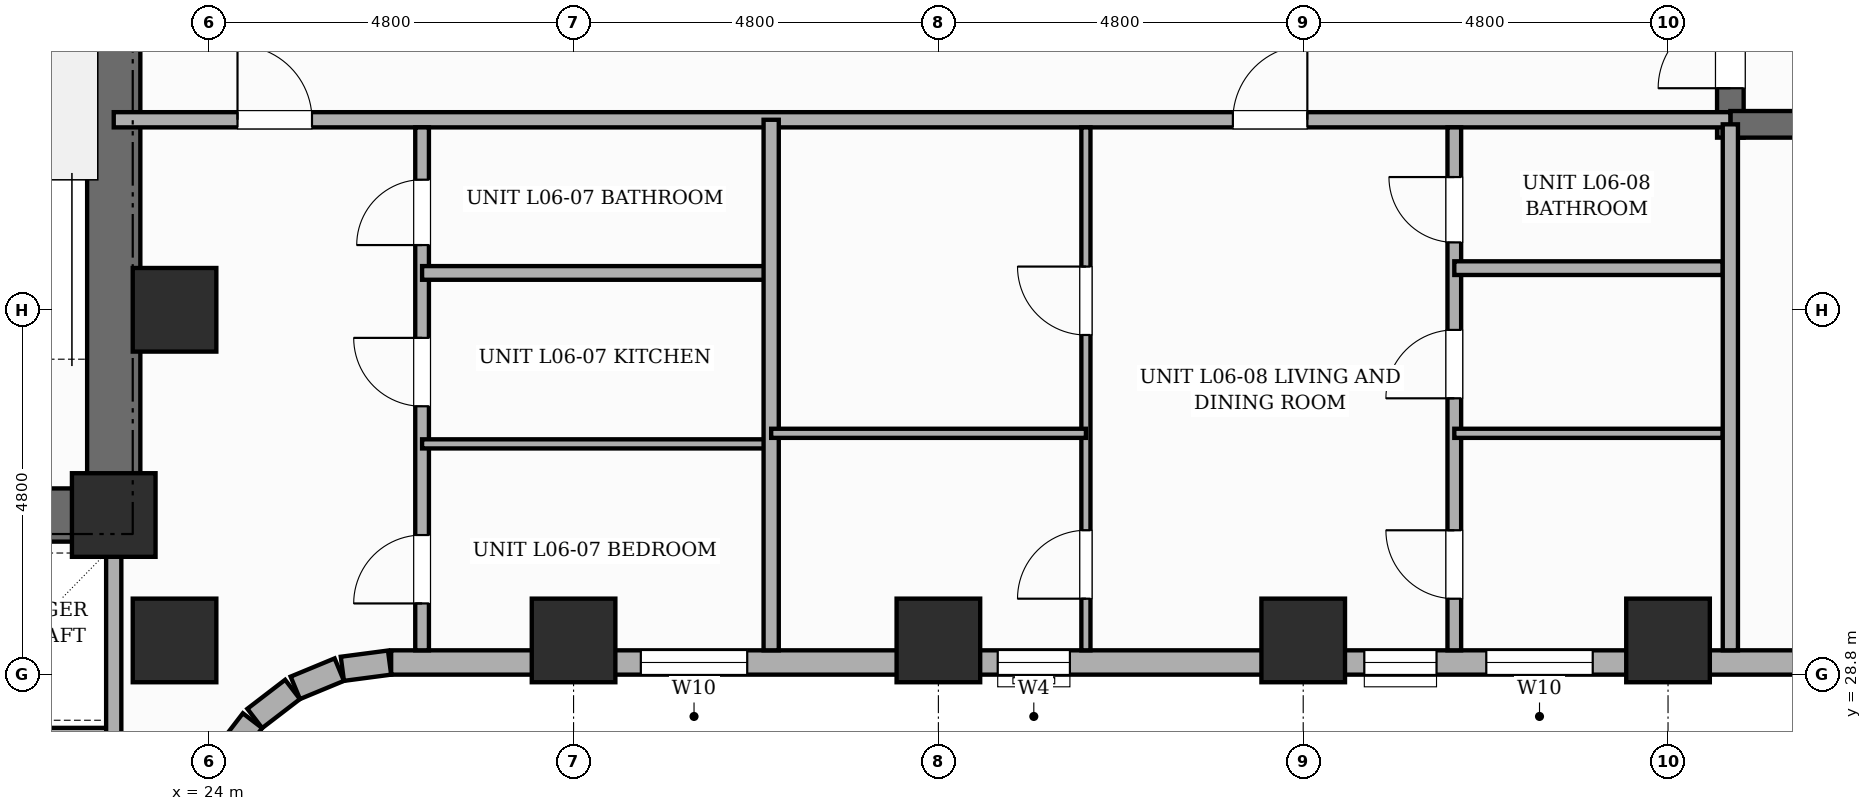
"""IFC4 building model, lengths in metres.
Left out: names, types, materials, properties, quantities, classifications, styles, units other than length and angle.
Written with IfcOpenShell. Run it as: python <this file> out.ifc"""

import sys

from ifc_helpers import new_model, si_unit, direction, frame, frame_2d, origin, origin_2d, place, context, subcontext, project, spatial, rectangle, extrude, element, fill, save


model = new_model("IFC4")
c1 = context("Model", 3, precision=1e-05, world=origin(), true_north=direction((0.0, 1.0)))
c2 = subcontext(c1, "Body", "Model", "MODEL_VIEW")
j1 = project(units=[si_unit("LENGTHUNIT", "METRE"), si_unit("PLANEANGLEUNIT", "RADIAN")], contexts=[c1])
p1 = place(None, origin())
s1 = spatial("IfcSite", under=j1, at=p1, CompositionType="ELEMENT")
p2 = place(p1, origin())
s2 = spatial("IfcBuilding", under=s1, at=p2, CompositionType="ELEMENT")
p3 = place(p2, frame((0.0, 0.0, 28.6)))
s3 = spatial("IfcBuildingStorey", under=s2, at=p3, CompositionType="ELEMENT", Elevation=28.6)
p4 = place(p3, frame((22.75, 30.55, 0.0), z_axis=(0.0, 0.0, 1.0), x_axis=(0.0, 1.0, 0.0)))
e1 = element("IfcWall", 1, at=p4, inside=s3, PredefinedType="SHEAR", context=c2, shape_type="SweptSolid", body=[
    extrude(rectangle(XDim=15.6, YDim=0.7, at=frame_2d((7.8, 0.0))), origin(), (0.0, 0.0, 1.0), 3.6),
])
p5 = place(p4, frame((10.8, 0.0, 0.0)))
e2 = element("IfcOpeningElement", 2, at=p5, cuts=e1, PredefinedType="OPENING", context=c2, shape_type="SweptSolid", body=[
    extrude(rectangle(XDim=1.0, YDim=2.15, at=frame_2d((0.5, 1.075))), frame((0.0, 0.36, 0.0), z_axis=(0.0, -1.0, 0.0), x_axis=(1.0, 0.0, 0.0)), (0.0, 0.0, 1.0), 0.72),
])
p6 = place(p3, frame((18.84, 30.9, 0.0), z_axis=(0.0, 0.0, 1.0), x_axis=(1.0, 0.0, 0.0)))
e3 = element("IfcWall", 3, at=p6, inside=s3, PredefinedType="SHEAR", context=c2, shape_type="SweptSolid", body=[
    extrude(rectangle(XDim=3.91, YDim=0.7, at=frame_2d((1.955, 0.0))), origin(), (0.0, 0.0, 1.0), 3.6),
])
p7 = place(p3, frame((44.02, 35.865, 0.0), z_axis=(0.0, 0.0, 1.0), x_axis=(0.0, 1.0, 0.0)))
e4 = element("IfcWall", 4, at=p7, inside=s3, PredefinedType="SHEAR", context=c2, shape_type="SweptSolid", body=[
    extrude(rectangle(XDim=8.97, YDim=0.35, at=frame_2d((4.485, 0.0))), origin(), (0.0, 0.0, 1.0), 3.6),
])
p8 = place(p7, frame((0.65, 0.0, 0.0)))
e5 = element("IfcOpeningElement", 5, at=p8, cuts=e4, PredefinedType="OPENING", context=c2, shape_type="SweptSolid", body=[
    extrude(rectangle(XDim=0.95, YDim=2.1, at=frame_2d((0.475, 1.05))), frame((0.0, 0.185, 0.0), z_axis=(0.0, -1.0, 0.0), x_axis=(1.0, 0.0, 0.0)), (0.0, 0.0, 1.0), 0.37),
])
p9 = place(p3, frame((44.02, 36.04, 0.0), z_axis=(0.0, 0.0, 1.0), x_axis=(1.0, 0.0, 0.0)))
e6 = element("IfcWall", 6, at=p9, inside=s3, PredefinedType="SHEAR", context=c2, shape_type="SweptSolid", body=[
    extrude(rectangle(XDim=3.58, YDim=0.35, at=frame_2d((1.79, 0.0))), origin(), (0.0, 0.0, 1.0), 3.6),
])
for number, where, z_axis, x_axis in (
    (7, (22.75, 30.9, 0.0), (0.0, 0.0, 1.0), (1.0, 0.0, 0.0)),
    (8, (23.55, 29.25, 0.0), (0.0, 0.0, 1.0), (1.0, 0.0, 0.0)),
    (9, (23.55, 33.6, 0.0), (0.0, 0.0, 1.0), (1.0, 0.0, 0.0)),
    (10, (28.8, 29.25, 0.0), (0.0, 0.0, 1.0), (1.0, 0.0, 0.0)),
    (11, (33.6, 29.25, 0.0), (0.0, 0.0, 1.0), (1.0, 0.0, 0.0)),
    (12, (38.4, 29.25, 0.0), (0.0, 0.0, 1.0), (1.0, 0.0, 0.0)),
    (13, (43.2, 29.25, 0.0), (0.0, 0.0, 1.0), (1.0, 0.0, 0.0)),
):
    element("IfcColumn", number, at=place(p3, frame(where, z_axis=z_axis, x_axis=x_axis)), inside=s3, PredefinedType="COLUMN", context=c2, shape_type="SweptSolid", body=[
        extrude(rectangle(XDim=1.1, YDim=1.1, at=origin_2d()), origin(), (0.0, 0.0, 1.0), 3.6),
    ])
p10 = place(p3, frame((55.2, 28.96, 0.0), z_axis=(0.0, 0.0, 1.0), x_axis=(-1.0, 0.0, 0.0)))
e14 = element("IfcWall", 14, at=p10, inside=s3, PredefinedType="STANDARD", context=c2, shape_type="SweptSolid", body=[
    extrude(rectangle(XDim=28.8, YDim=0.32, at=frame_2d((14.4, 0.0))), origin(), (0.0, 0.0, 1.0), 2.53),
])
p11 = place(p10, frame((24.115, 0.0, 0.65)))
e15 = element("IfcOpeningElement", 15, at=p11, cuts=e14, PredefinedType="OPENING", context=c2, shape_type="SweptSolid", body=[
    extrude(rectangle(XDim=1.4, YDim=1.1, at=frame_2d((0.7, 0.55))), frame((0.0, 0.17, 0.0), z_axis=(0.0, -1.0, 0.0), x_axis=(1.0, 0.0, 0.0)), (0.0, 0.0, 1.0), 0.34),
])
p12 = place(p10, frame((12.991, 0.0, 0.65)))
e16 = element("IfcOpeningElement", 16, at=p12, cuts=e14, PredefinedType="OPENING", context=c2, shape_type="SweptSolid", body=[
    extrude(rectangle(XDim=1.4, YDim=1.1, at=frame_2d((0.7, 0.55))), frame((0.0, 0.17, 0.0), z_axis=(0.0, -1.0, 0.0), x_axis=(1.0, 0.0, 0.0)), (0.0, 0.0, 1.0), 0.34),
])
p13 = place(p10, frame((19.869, 0.0, 0.45)))
e17 = element("IfcOpeningElement", 17, at=p13, cuts=e14, PredefinedType="OPENING", context=c2, shape_type="SweptSolid", body=[
    extrude(rectangle(XDim=0.95, YDim=1.8, at=frame_2d((0.475, 0.9))), frame((0.0, 0.17, 0.0), z_axis=(0.0, -1.0, 0.0), x_axis=(1.0, 0.0, 0.0)), (0.0, 0.0, 1.0), 0.34),
])
p14 = place(p10, frame((4.79, 0.0, 0.65)))
e18 = element("IfcOpeningElement", 18, at=p14, cuts=e14, PredefinedType="OPENING", context=c2, shape_type="SweptSolid", body=[
    extrude(rectangle(XDim=1.4, YDim=1.1, at=frame_2d((0.7, 0.55))), frame((0.0, 0.17, 0.0), z_axis=(0.0, -1.0, 0.0), x_axis=(1.0, 0.0, 0.0)), (0.0, 0.0, 1.0), 0.34),
])
p15 = place(p10, frame((0.47, 0.0, 0.65)))
e19 = element("IfcOpeningElement", 19, at=p15, cuts=e14, PredefinedType="OPENING", context=c2, shape_type="SweptSolid", body=[
    extrude(rectangle(XDim=1.4, YDim=1.1, at=frame_2d((0.7, 0.55))), frame((0.0, 0.17, 0.0), z_axis=(0.0, -1.0, 0.0), x_axis=(1.0, 0.0, 0.0)), (0.0, 0.0, 1.0), 0.34),
])
p16 = place(p10, frame((15.046, 0.0, 0.45)))
e20 = element("IfcOpeningElement", 20, at=p16, cuts=e14, PredefinedType="OPENING", context=c2, shape_type="SweptSolid", body=[
    extrude(rectangle(XDim=0.95, YDim=1.8, at=frame_2d((0.475, 0.9))), frame((0.0, 0.17, 0.0), z_axis=(0.0, -1.0, 0.0), x_axis=(1.0, 0.0, 0.0)), (0.0, 0.0, 1.0), 0.34),
])
p17 = place(p3, frame((26.379, 28.958, 0.0), z_axis=(0.0, 0.0, 1.0), x_axis=(-0.991447664465, -0.130504898859, 0.0)))
e21 = element("IfcWall", 21, at=p17, inside=s3, PredefinedType="STANDARD", context=c2, shape_type="SweptSolid", body=[
    extrude(rectangle(XDim=0.627, YDim=0.32, at=frame_2d((0.313, 0.0))), origin(), (0.0, 0.0, 1.0), 2.53),
])
p18 = place(p3, frame((25.718, 28.866, 0.0), z_axis=(0.0, 0.0, 1.0), x_axis=(-0.923836271867, -0.382787856107, 0.0)))
e22 = element("IfcWall", 22, at=p18, inside=s3, PredefinedType="STANDARD", context=c2, shape_type="SweptSolid", body=[
    extrude(rectangle(XDim=0.626, YDim=0.32, at=frame_2d((0.313, 0.0))), origin(), (0.0, 0.0, 1.0), 3.35),
])
for number, where, z_axis, x_axis in (
    (23, (25.103, 28.605, 0.0), (0.0, 0.0, 1.0), (-0.793, -0.609, 0.0)),
    (24, (24.576, 28.195, 0.0), (0.0, 0.0, 1.0), (-0.609, -0.793, 0.0)),
):
    element("IfcWall", number, at=place(p3, frame(where, z_axis=z_axis, x_axis=x_axis)), inside=s3, PredefinedType="STANDARD", context=c2, shape_type="SweptSolid", body=[
        extrude(rectangle(XDim=0.626, YDim=0.32, at=frame_2d((0.313, 0.0))), origin(), (0.0, 0.0, 1.0), 3.35),
    ])
p19 = place(p3, frame((15.5, 28.0, 0.0), z_axis=(0.0, 0.0, 1.0), x_axis=(1.0, 0.0, 0.0)))
e25 = element("IfcWall", 25, at=p19, inside=s3, PredefinedType="POLYGONAL", context=c2, shape_type="SweptSolid", body=[
    extrude(rectangle(XDim=7.25, YDim=0.2, at=frame_2d((3.625, 0.0))), origin(), (0.0, 0.0, 1.0), 3.35),
])
p20 = place(p3, frame((22.75, 27.9, 0.0), z_axis=(0.0, 0.0, 1.0), x_axis=(0.0, 1.0, 0.0)))
e26 = element("IfcWall", 26, at=p20, inside=s3, PredefinedType="POLYGONAL", context=c2, shape_type="SweptSolid", body=[
    extrude(rectangle(XDim=3.0, YDim=0.2, at=frame_2d((1.5, 0.0))), origin(), (0.0, 0.0, 1.0), 3.35),
])
p21 = place(p3, frame((22.75, 36.1, 0.0), z_axis=(0.0, 0.0, 1.0), x_axis=(1.0, 0.0, 0.0)))
e27 = element("IfcWall", 27, at=p21, inside=s3, PredefinedType="PARTITIONING", context=c2, shape_type="SweptSolid", body=[
    extrude(rectangle(XDim=21.27, YDim=0.2, at=frame_2d((10.635, 0.0))), origin(), (0.0, 0.0, 1.0), 3.35),
])
p22 = place(p21, frame((1.628, 0.0, 0.0)))
e28 = element("IfcOpeningElement", 28, at=p22, cuts=e27, PredefinedType="OPENING", context=c2, shape_type="SweptSolid", body=[
    extrude(rectangle(XDim=0.98, YDim=2.18, at=frame_2d((0.49, 1.09))), frame((0.0, 0.11, 0.0), z_axis=(0.0, -1.0, 0.0), x_axis=(1.0, 0.0, 0.0)), (0.0, 0.0, 1.0), 0.22),
])
p23 = place(p21, frame((14.725, 0.0, 0.0)))
e29 = element("IfcOpeningElement", 29, at=p23, cuts=e27, PredefinedType="OPENING", context=c2, shape_type="SweptSolid", body=[
    extrude(rectangle(XDim=0.98, YDim=2.18, at=frame_2d((0.49, 1.09))), frame((0.0, 0.11, 0.0), z_axis=(0.0, -1.0, 0.0), x_axis=(1.0, 0.0, 0.0)), (0.0, 0.0, 1.0), 0.22),
])
p24 = place(p3, frame((26.807, 29.12, 0.0), z_axis=(0.0, 0.0, 1.0), x_axis=(0.0, 1.0, 0.0)))
e30 = element("IfcWall", 30, at=p24, inside=s3, PredefinedType="PLUMBINGWALL", context=c2, shape_type="SweptSolid", body=[
    extrude(rectangle(XDim=6.88, YDim=0.18, at=frame_2d((3.44, 0.0))), origin(), (0.0, 0.0, 1.0), 3.35),
])
p25 = place(p24, frame((0.617, 0.0, 0.0)))
e31 = element("IfcOpeningElement", 31, at=p25, cuts=e30, PredefinedType="OPENING", context=c2, shape_type="SweptSolid", body=[
    extrude(rectangle(XDim=0.9, YDim=2.15, at=frame_2d((0.45, 1.075))), frame((0.0, 0.1, 0.0), z_axis=(0.0, -1.0, 0.0), x_axis=(1.0, 0.0, 0.0)), (0.0, 0.0, 1.0), 0.2),
])
p26 = place(p24, frame((3.21, 0.0, 0.0)))
e32 = element("IfcOpeningElement", 32, at=p26, cuts=e30, PredefinedType="OPENING", context=c2, shape_type="SweptSolid", body=[
    extrude(rectangle(XDim=0.9, YDim=2.15, at=frame_2d((0.45, 1.075))), frame((0.0, 0.1, 0.0), z_axis=(0.0, -1.0, 0.0), x_axis=(1.0, 0.0, 0.0)), (0.0, 0.0, 1.0), 0.2),
])
p27 = place(p24, frame((5.332, 0.0, 0.0)))
e33 = element("IfcOpeningElement", 33, at=p27, cuts=e30, PredefinedType="OPENING", context=c2, shape_type="SweptSolid", body=[
    extrude(rectangle(XDim=0.86, YDim=2.1, at=frame_2d((0.43, 1.05))), frame((0.0, 0.1, 0.0), z_axis=(0.0, -1.0, 0.0), x_axis=(1.0, 0.0, 0.0)), (0.0, 0.0, 1.0), 0.2),
])
p28 = place(p3, frame((26.807, 31.836, 0.0), z_axis=(0.0, 0.0, 1.0), x_axis=(1.0, 0.0, 0.0)))
e34 = element("IfcWall", 34, at=p28, inside=s3, PredefinedType="PARTITIONING", context=c2, shape_type="SweptSolid", body=[
    extrude(rectangle(XDim=4.593, YDim=0.12, at=frame_2d((2.296, 0.0))), origin(), (0.0, 0.0, 1.0), 3.35),
])
p29 = place(p3, frame((26.807, 34.085, 0.0), z_axis=(0.0, 0.0, 1.0), x_axis=(1.0, 0.0, 0.0)))
e35 = element("IfcWall", 35, at=p29, inside=s3, PredefinedType="PLUMBINGWALL", context=c2, shape_type="SweptSolid", body=[
    extrude(rectangle(XDim=4.593, YDim=0.18, at=frame_2d((2.296, 0.0))), origin(), (0.0, 0.0, 1.0), 3.35),
])
p30 = place(p3, frame((31.4, 29.12, 0.0), z_axis=(0.0, 0.0, 1.0), x_axis=(0.0, 1.0, 0.0)))
e36 = element("IfcWall", 36, at=p30, inside=s3, PredefinedType="SOLIDWALL", context=c2, shape_type="SweptSolid", body=[
    extrude(rectangle(XDim=6.98, YDim=0.2, at=frame_2d((3.49, 0.0))), origin(), (0.0, 0.0, 1.0), 3.35),
])
p31 = place(p3, frame((40.388, 29.12, 0.0), z_axis=(0.0, 0.0, 1.0), x_axis=(0.0, 1.0, 0.0)))
e37 = element("IfcWall", 37, at=p31, inside=s3, PredefinedType="PLUMBINGWALL", context=c2, shape_type="SweptSolid", body=[
    extrude(rectangle(XDim=6.88, YDim=0.18, at=frame_2d((3.44, 0.0))), origin(), (0.0, 0.0, 1.0), 3.35),
])
p32 = place(p31, frame((0.679, 0.0, 0.0)))
e38 = element("IfcOpeningElement", 38, at=p32, cuts=e37, PredefinedType="OPENING", context=c2, shape_type="SweptSolid", body=[
    extrude(rectangle(XDim=0.9, YDim=2.15, at=frame_2d((0.45, 1.075))), frame((0.0, 0.1, 0.0), z_axis=(0.0, -1.0, 0.0), x_axis=(1.0, 0.0, 0.0)), (0.0, 0.0, 1.0), 0.2),
])
p33 = place(p31, frame((3.315, 0.0, 0.0)))
e39 = element("IfcOpeningElement", 39, at=p33, cuts=e37, PredefinedType="OPENING", context=c2, shape_type="SweptSolid", body=[
    extrude(rectangle(XDim=0.9, YDim=2.15, at=frame_2d((0.45, 1.075))), frame((0.0, 0.1, 0.0), z_axis=(0.0, -1.0, 0.0), x_axis=(1.0, 0.0, 0.0)), (0.0, 0.0, 1.0), 0.2),
])
p34 = place(p31, frame((5.366, 0.0, 0.0)))
e40 = element("IfcOpeningElement", 40, at=p34, cuts=e37, PredefinedType="OPENING", context=c2, shape_type="SweptSolid", body=[
    extrude(rectangle(XDim=0.86, YDim=2.1, at=frame_2d((0.43, 1.05))), frame((0.0, 0.1, 0.0), z_axis=(0.0, -1.0, 0.0), x_axis=(1.0, 0.0, 0.0)), (0.0, 0.0, 1.0), 0.2),
])
p35 = place(p3, frame((35.541, 29.12, 0.0), z_axis=(0.0, 0.0, 1.0), x_axis=(0.0, 1.0, 0.0)))
e41 = element("IfcWall", 41, at=p35, inside=s3, PredefinedType="PARTITIONING", context=c2, shape_type="SweptSolid", body=[
    extrude(rectangle(XDim=6.88, YDim=0.12, at=frame_2d((3.44, 0.0))), origin(), (0.0, 0.0, 1.0), 3.35),
])
p36 = place(p35, frame((0.679, 0.0, 0.0)))
e42 = element("IfcOpeningElement", 42, at=p36, cuts=e41, PredefinedType="OPENING", context=c2, shape_type="SweptSolid", body=[
    extrude(rectangle(XDim=0.9, YDim=2.15, at=frame_2d((0.45, 1.075))), frame((0.0, 0.07, 0.0), z_axis=(0.0, -1.0, 0.0), x_axis=(1.0, 0.0, 0.0)), (0.0, 0.0, 1.0), 0.14),
])
p37 = place(p35, frame((4.149, 0.0, 0.0)))
e43 = element("IfcOpeningElement", 43, at=p37, cuts=e41, PredefinedType="OPENING", context=c2, shape_type="SweptSolid", body=[
    extrude(rectangle(XDim=0.9, YDim=2.15, at=frame_2d((0.45, 1.075))), frame((0.0, 0.07, 0.0), z_axis=(0.0, -1.0, 0.0), x_axis=(1.0, 0.0, 0.0)), (0.0, 0.0, 1.0), 0.14),
])
p38 = place(p3, frame((31.4, 31.975, 0.0), z_axis=(0.0, 0.0, 1.0), x_axis=(1.0, 0.0, 0.0)))
e44 = element("IfcWall", 44, at=p38, inside=s3, PredefinedType="PARTITIONING", context=c2, shape_type="SweptSolid", body=[
    extrude(rectangle(XDim=4.141, YDim=0.12, at=frame_2d((2.071, 0.0))), origin(), (0.0, 0.0, 1.0), 3.35),
])
p39 = place(p3, frame((40.388, 31.975, 0.0), z_axis=(0.0, 0.0, 1.0), x_axis=(1.0, 0.0, 0.0)))
e45 = element("IfcWall", 45, at=p39, inside=s3, PredefinedType="PARTITIONING", context=c2, shape_type="SweptSolid", body=[
    extrude(rectangle(XDim=3.532, YDim=0.12, at=frame_2d((1.766, 0.0))), origin(), (0.0, 0.0, 1.0), 3.35),
])
p40 = place(p3, frame((40.388, 34.148, 0.0), z_axis=(0.0, 0.0, 1.0), x_axis=(1.0, 0.0, 0.0)))
e46 = element("IfcWall", 46, at=p40, inside=s3, PredefinedType="PLUMBINGWALL", context=c2, shape_type="SweptSolid", body=[
    extrude(rectangle(XDim=3.532, YDim=0.18, at=frame_2d((1.766, 0.0))), origin(), (0.0, 0.0, 1.0), 3.35),
])
p41 = place(p3, frame((44.02, 29.12, 0.0), z_axis=(0.0, 0.0, 1.0), x_axis=(0.0, 1.0, 0.0)))
e47 = element("IfcWall", 47, at=p41, inside=s3, PredefinedType="SOLIDWALL", context=c2, shape_type="SweptSolid", body=[
    extrude(rectangle(XDim=6.92, YDim=0.2, at=frame_2d((3.46, 0.0))), origin(), (0.0, 0.0, 1.0), 3.35),
])
p42 = place(p11, origin())
e48 = element("IfcWindow", 48, at=p42, inside=s3, PartitioningType="SINGLE_PANEL", PredefinedType="WINDOW", context=c2, shape_type="SweptSolid", body=[
    extrude(rectangle(XDim=1.4, YDim=1.1, at=frame_2d((0.7, 0.55))), frame((0.0, 0.03, 0.0), z_axis=(0.0, -1.0, 0.0), x_axis=(1.0, 0.0, 0.0)), (0.0, 0.0, 1.0), 0.06),
])
fill(e15, e48)
p43 = place(p12, origin())
e49 = element("IfcWindow", 49, at=p43, inside=s3, PartitioningType="SINGLE_PANEL", PredefinedType="WINDOW", context=c2, shape_type="SweptSolid", body=[
    extrude(rectangle(XDim=1.4, YDim=1.1, at=frame_2d((0.7, 0.55))), frame((0.0, 0.03, 0.0), z_axis=(0.0, -1.0, 0.0), x_axis=(1.0, 0.0, 0.0)), (0.0, 0.0, 1.0), 0.06),
])
fill(e16, e49)
p44 = place(p13, origin())
e50 = element("IfcWindow", 50, at=p44, inside=s3, PartitioningType="SINGLE_PANEL", PredefinedType="WINDOW", context=c2, shape_type="SweptSolid", body=[
    extrude(rectangle(XDim=0.95, YDim=1.8, at=frame_2d((0.475, 0.9))), frame((0.0, 0.03, 0.0), z_axis=(0.0, -1.0, 0.0), x_axis=(1.0, 0.0, 0.0)), (0.0, 0.0, 1.0), 0.06),
])
fill(e17, e50)
p45 = place(p16, origin())
e51 = element("IfcWindow", 51, at=p45, inside=s3, PartitioningType="SINGLE_PANEL", PredefinedType="WINDOW", context=c2, shape_type="SweptSolid", body=[
    extrude(rectangle(XDim=0.95, YDim=1.8, at=frame_2d((0.475, 0.9))), frame((0.0, 0.03, 0.0), z_axis=(0.0, -1.0, 0.0), x_axis=(1.0, 0.0, 0.0)), (0.0, 0.0, 1.0), 0.06),
])
fill(e20, e51)
p46 = place(p8, origin())
e52 = element("IfcDoor", 52, at=p46, inside=s3, OperationType="SINGLE_SWING_LEFT", PredefinedType="DOOR", context=c2, shape_type="SweptSolid", body=[
    extrude(rectangle(XDim=0.95, YDim=2.1, at=frame_2d((0.475, 1.05))), frame((0.0, 0.025, 0.0), z_axis=(0.0, -1.0, 0.0), x_axis=(1.0, 0.0, 0.0)), (0.0, 0.0, 1.0), 0.05),
])
fill(e5, e52)
p47 = place(p22, origin())
e53 = element("IfcDoor", 53, at=p47, inside=s3, OperationType="SINGLE_SWING_LEFT", PredefinedType="DOOR", context=c2, shape_type="SweptSolid", body=[
    extrude(rectangle(XDim=0.98, YDim=2.18, at=frame_2d((0.49, 1.09))), frame((0.0, 0.025, 0.0), z_axis=(0.0, -1.0, 0.0), x_axis=(1.0, 0.0, 0.0)), (0.0, 0.0, 1.0), 0.05),
])
fill(e28, e53)
p48 = place(p25, origin())
e54 = element("IfcDoor", 54, at=p48, inside=s3, OperationType="SINGLE_SWING_LEFT", PredefinedType="DOOR", context=c2, shape_type="SweptSolid", body=[
    extrude(rectangle(XDim=0.9, YDim=2.15, at=frame_2d((0.45, 1.075))), frame((0.0, 0.025, 0.0), z_axis=(0.0, -1.0, 0.0), x_axis=(1.0, 0.0, 0.0)), (0.0, 0.0, 1.0), 0.05),
])
fill(e31, e54)
p49 = place(p26, origin())
e55 = element("IfcDoor", 55, at=p49, inside=s3, OperationType="SINGLE_SWING_RIGHT", PredefinedType="DOOR", context=c2, shape_type="SweptSolid", body=[
    extrude(rectangle(XDim=0.9, YDim=2.15, at=frame_2d((0.45, 1.075))), frame((0.0, 0.025, 0.0), z_axis=(0.0, -1.0, 0.0), x_axis=(1.0, 0.0, 0.0)), (0.0, 0.0, 1.0), 0.05),
])
fill(e32, e55)
p50 = place(p27, origin())
e56 = element("IfcDoor", 56, at=p50, inside=s3, OperationType="SINGLE_SWING_LEFT", PredefinedType="DOOR", context=c2, shape_type="SweptSolid", body=[
    extrude(rectangle(XDim=0.86, YDim=2.1, at=frame_2d((0.43, 1.05))), frame((0.0, 0.025, 0.0), z_axis=(0.0, -1.0, 0.0), x_axis=(1.0, 0.0, 0.0)), (0.0, 0.0, 1.0), 0.05),
])
fill(e33, e56)
p51 = place(p23, origin())
e57 = element("IfcDoor", 57, at=p51, inside=s3, OperationType="SINGLE_SWING_RIGHT", PredefinedType="DOOR", context=c2, shape_type="SweptSolid", body=[
    extrude(rectangle(XDim=0.98, YDim=2.18, at=frame_2d((0.49, 1.09))), frame((0.0, 0.025, 0.0), z_axis=(0.0, -1.0, 0.0), x_axis=(1.0, 0.0, 0.0)), (0.0, 0.0, 1.0), 0.05),
])
fill(e29, e57)
p52 = place(p36, origin())
e58 = element("IfcDoor", 58, at=p52, inside=s3, OperationType="SINGLE_SWING_LEFT", PredefinedType="DOOR", context=c2, shape_type="SweptSolid", body=[
    extrude(rectangle(XDim=0.9, YDim=2.15, at=frame_2d((0.45, 1.075))), frame((0.0, 0.025, 0.0), z_axis=(0.0, -1.0, 0.0), x_axis=(1.0, 0.0, 0.0)), (0.0, 0.0, 1.0), 0.05),
])
fill(e42, e58)
p53 = place(p37, origin())
e59 = element("IfcDoor", 59, at=p53, inside=s3, OperationType="SINGLE_SWING_RIGHT", PredefinedType="DOOR", context=c2, shape_type="SweptSolid", body=[
    extrude(rectangle(XDim=0.9, YDim=2.15, at=frame_2d((0.45, 1.075))), frame((0.0, 0.025, 0.0), z_axis=(0.0, -1.0, 0.0), x_axis=(1.0, 0.0, 0.0)), (0.0, 0.0, 1.0), 0.05),
])
fill(e43, e59)
p54 = place(p32, origin())
e60 = element("IfcDoor", 60, at=p54, inside=s3, OperationType="SINGLE_SWING_RIGHT", PredefinedType="DOOR", context=c2, shape_type="SweptSolid", body=[
    extrude(rectangle(XDim=0.9, YDim=2.15, at=frame_2d((0.45, 1.075))), frame((0.0, 0.025, 0.0), z_axis=(0.0, -1.0, 0.0), x_axis=(1.0, 0.0, 0.0)), (0.0, 0.0, 1.0), 0.05),
])
fill(e38, e60)
p55 = place(p33, origin())
e61 = element("IfcDoor", 61, at=p55, inside=s3, OperationType="SINGLE_SWING_LEFT", PredefinedType="DOOR", context=c2, shape_type="SweptSolid", body=[
    extrude(rectangle(XDim=0.9, YDim=2.15, at=frame_2d((0.45, 1.075))), frame((0.0, 0.025, 0.0), z_axis=(0.0, -1.0, 0.0), x_axis=(1.0, 0.0, 0.0)), (0.0, 0.0, 1.0), 0.05),
])
fill(e39, e61)
p56 = place(p34, origin())
e62 = element("IfcDoor", 62, at=p56, inside=s3, OperationType="SINGLE_SWING_RIGHT", PredefinedType="DOOR", context=c2, shape_type="SweptSolid", body=[
    extrude(rectangle(XDim=0.86, YDim=2.1, at=frame_2d((0.43, 1.05))), frame((0.0, 0.025, 0.0), z_axis=(0.0, -1.0, 0.0), x_axis=(1.0, 0.0, 0.0)), (0.0, 0.0, 1.0), 0.05),
])
fill(e40, e62)
save(model, sys.argv[1])
